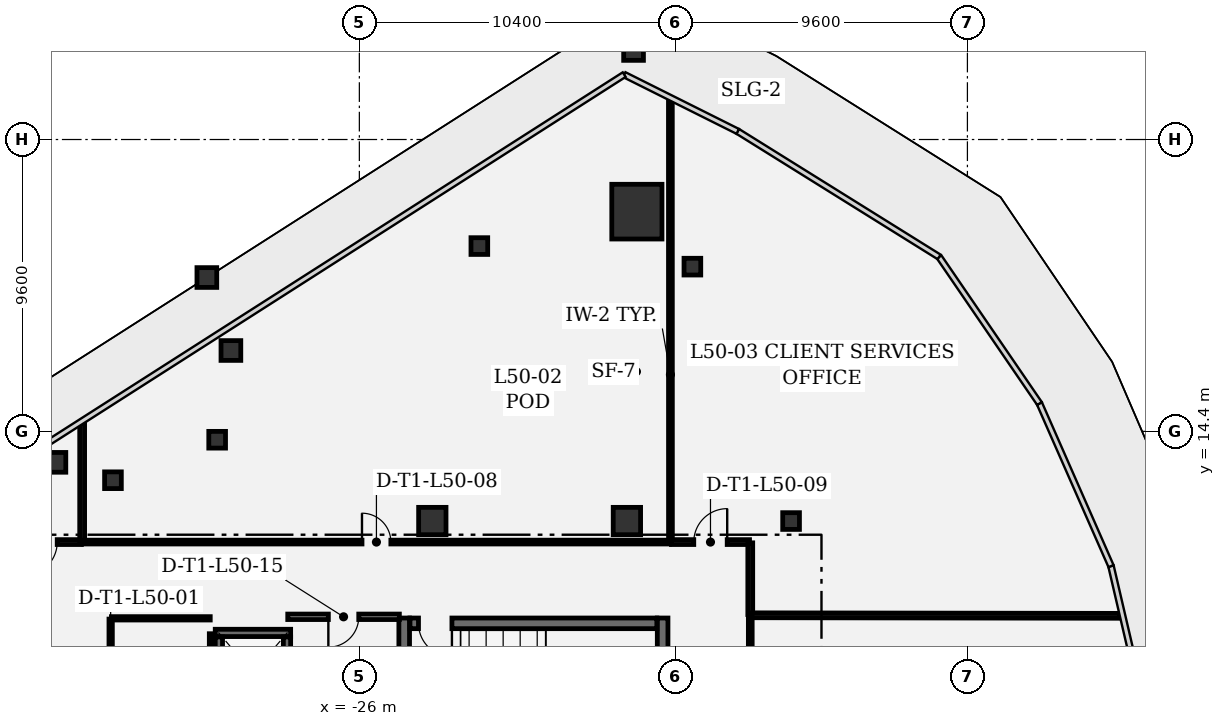
"""IFC4 building model, lengths in metres.
Left out: names, types, materials, properties, quantities, classifications, styles, units other than length and angle.
Written with IfcOpenShell. Run it as: python <this file> out.ifc"""

import sys

from ifc_helpers import new_model, si_unit, direction, frame, frame_2d, origin, origin_2d, place, context, subcontext, project, spatial, rectangle, extrude, element, fill, save


model = new_model("IFC4")
c1 = context("Model", 3, precision=1e-05, world=origin(), true_north=direction((0.0, 1.0)))
c2 = subcontext(c1, "Body", "Model", "MODEL_VIEW")
j1 = project(units=[si_unit("LENGTHUNIT", "METRE"), si_unit("PLANEANGLEUNIT", "RADIAN")], contexts=[c1])
p1 = place(None, origin())
s1 = spatial("IfcSite", under=j1, at=p1, CompositionType="ELEMENT")
p2 = place(p1, origin())
s2 = spatial("IfcBuilding", under=s1, at=p2, CompositionType="ELEMENT")
p3 = place(p2, frame((0.0, 0.0, 217.2)))
s3 = spatial("IfcBuildingStorey", under=s2, at=p3, CompositionType="ELEMENT", Elevation=217.2)
p4 = place(p3, frame((-16.872, 21.627, 0.0), z_axis=(0.0, 0.0, 1.0), x_axis=(1.0, 0.0, 0.0)))
e1 = element("IfcColumn", 1, at=p4, inside=s3, PredefinedType="COLUMN", context=c2, shape_type="SweptSolid", body=[
    extrude(rectangle(XDim=1.65, YDim=1.8, at=origin_2d()), origin(), (0.0, 0.0, 1.0), 4.05),
])
for number, where, z_axis, x_axis in (
    (2, (-23.6, 11.45, 0.0), (0.0, 0.0, 1.0), (1.0, 0.0, 0.0)),
    (3, (-17.2, 11.45, 0.0), (0.0, 0.0, 1.0), (1.0, 0.0, 0.0)),
):
    element("IfcColumn", number, at=place(p3, frame(where, z_axis=z_axis, x_axis=x_axis)), inside=s3, PredefinedType="COLUMN", context=c2, shape_type="SweptSolid", body=[
        extrude(rectangle(XDim=0.9, YDim=0.9, at=origin_2d()), origin(), (0.0, 0.0, 1.0), 4.05),
    ])
for number, where, z_axis, x_axis in (
    (4, (-31.016, 19.46, 0.0), (0.0, 0.0, 1.0), (1.0, 0.0, 0.0)),
    (5, (-16.981, 26.929, 0.0), (0.0, 0.0, 1.0), (1.0, 0.0, 0.0)),
    (6, (-35.981, 13.381, 0.0), (0.0, 0.0, 1.0), (1.0, 0.0, 0.0)),
    (7, (-30.225, 17.06, 0.0), (0.0, 0.0, 1.0), (1.0, 0.0, 0.0)),
):
    element("IfcColumn", number, at=place(p3, frame(where, z_axis=z_axis, x_axis=x_axis)), inside=s3, PredefinedType="COLUMN", context=c2, shape_type="SweptSolid", body=[
        extrude(rectangle(XDim=0.65, YDim=0.65, at=origin_2d()), origin(), (0.0, 0.0, 1.0), 4.05),
    ])
for number, where, z_axis, x_axis in (
    (8, (-34.104, 12.792, 0.0), (0.0, 0.0, 1.0), (1.0, 0.0, 0.0)),
    (9, (-22.053, 20.495, 0.0), (0.0, 0.0, 1.0), (1.0, 0.0, 0.0)),
    (10, (-30.677, 14.124, 0.0), (0.0, 0.0, 1.0), (1.0, 0.0, 0.0)),
    (11, (-15.046, 19.818, 0.0), (0.0, 0.0, 1.0), (1.0, 0.0, 0.0)),
    (12, (-11.8, 11.45, 0.0), (0.0, 0.0, 1.0), (1.0, 0.0, 0.0)),
):
    element("IfcColumn", number, at=place(p3, frame(where, z_axis=z_axis, x_axis=x_axis)), inside=s3, PredefinedType="COLUMN", context=c2, shape_type="SweptSolid", body=[
        extrude(rectangle(XDim=0.55, YDim=0.55, at=origin_2d()), origin(), (0.0, 0.0, 1.0), 4.05),
    ])
for number, where, z_axis, x_axis in (
    (13, (-24.525, 8.26, 0.0), (0.0, 0.0, 1.0), (0.0, -1.0, 0.0)),
    (14, (-16.025, 4.05, 0.0), (0.0, 0.0, 1.0), (0.0, 1.0, 0.0)),
):
    element("IfcWall", number, at=place(p3, frame(where, z_axis=z_axis, x_axis=x_axis)), inside=s3, PredefinedType="SHEAR", context=c2, shape_type="SweptSolid", body=[
        extrude(rectangle(XDim=4.21, YDim=0.35, at=frame_2d((2.105, 0.0))), origin(), (0.0, 0.0, 1.0), 3.78),
    ])
p5 = place(p3, frame((-16.215, 8.085, 0.0), z_axis=(0.0, 0.0, 1.0), x_axis=(-1.0, 0.0, 0.0)))
e15 = element("IfcWall", 15, at=p5, inside=s3, PredefinedType="SHEAR", context=c2, shape_type="SweptSolid", body=[
    extrude(rectangle(XDim=8.12, YDim=0.35, at=frame_2d((4.06, 0.0))), origin(), (0.0, 0.0, 1.0), 3.78),
])
p6 = place(p5, frame((6.74, 0.0, 0.0)))
e16 = element("IfcOpeningElement", 16, at=p6, cuts=e15, PredefinedType="OPENING", context=c2, shape_type="SweptSolid", body=[
    extrude(rectangle(XDim=1.1, YDim=2.2, at=frame_2d((0.55, 1.1))), frame((0.0, 0.185, 0.0), z_axis=(0.0, -1.0, 0.0), x_axis=(1.0, 0.0, 0.0)), (0.0, 0.0, 1.0), 0.37),
])
p7 = place(p3, frame((-30.74, 7.77, 0.0), z_axis=(0.0, 0.0, 1.0), x_axis=(1.0, 0.0, 0.0)))
e17 = element("IfcWall", 17, at=p7, inside=s3, PredefinedType="SHEAR", context=c2, shape_type="SweptSolid", body=[
    extrude(rectangle(XDim=2.48, YDim=0.24, at=frame_2d((1.24, 0.0))), origin(), (0.0, 0.0, 1.0), 3.78),
])
p8 = place(p3, frame((-30.62, 5.262, 0.0), z_axis=(0.0, 0.0, 1.0), x_axis=(0.0, 1.0, 0.0)))
e18 = element("IfcWall", 18, at=p8, inside=s3, PredefinedType="SHEAR", context=c2, shape_type="SweptSolid", body=[
    extrude(rectangle(XDim=2.376, YDim=0.24, at=frame_2d((1.188, 0.0))), origin(), (0.0, 0.0, 1.0), 3.78),
])
p9 = place(p3, frame((-28.38, 7.638, 0.0), z_axis=(0.0, 0.0, 1.0), x_axis=(0.0, -1.0, 0.0)))
e19 = element("IfcWall", 19, at=p9, inside=s3, PredefinedType="SHEAR", context=c2, shape_type="SweptSolid", body=[
    extrude(rectangle(XDim=2.376, YDim=0.24, at=frame_2d((1.188, 0.0))), origin(), (0.0, 0.0, 1.0), 3.78),
])
p10 = place(p9, frame((0.538, 0.0, 0.0)))
e20 = element("IfcOpeningElement", 20, at=p10, cuts=e19, PredefinedType="OPENING", context=c2, shape_type="SweptSolid", body=[
    extrude(rectangle(XDim=1.3, YDim=2.3, at=frame_2d((0.65, 1.15))), frame((0.0, 0.13, 0.0), z_axis=(0.0, -1.0, 0.0), x_axis=(1.0, 0.0, 0.0)), (0.0, 0.0, 1.0), 0.26),
])
p11 = place(p3, frame((-24.684, 8.3, 0.0), z_axis=(0.0, 0.0, 1.0), x_axis=(-1.0, 0.0, 0.0)))
e21 = element("IfcWall", 21, at=p11, inside=s3, PredefinedType="PARTITIONING", context=c2, shape_type="SweptSolid", body=[
    extrude(rectangle(XDim=3.671, YDim=0.18, at=frame_2d((1.835, 0.0))), origin(), (0.0, 0.0, 1.0), 3.78),
])
p12 = place(p11, frame((1.335, 0.0, 0.0)))
e22 = element("IfcOpeningElement", 22, at=p12, cuts=e21, PredefinedType="OPENING", context=c2, shape_type="SweptSolid", body=[
    extrude(rectangle(XDim=1.0, YDim=2.15, at=frame_2d((0.5, 1.075))), frame((0.0, 0.1, 0.0), z_axis=(0.0, -1.0, 0.0), x_axis=(1.0, 0.0, 0.0)), (0.0, 0.0, 1.0), 0.2),
])
p13 = place(p3, frame((-34.18, 8.225, 0.0), z_axis=(0.0, 0.0, 1.0), x_axis=(0.0, -1.0, 0.0)))
e23 = element("IfcWall", 23, at=p13, inside=s3, PredefinedType="PARTITIONING", context=c2, shape_type="SweptSolid", body=[
    extrude(rectangle(XDim=3.15, YDim=0.11, at=frame_2d((1.575, 0.0))), origin(), (0.0, 0.0, 1.0), 3.78),
])
p14 = place(p13, frame((1.135, 0.0, 0.0)))
e24 = element("IfcOpeningElement", 24, at=p14, cuts=e23, PredefinedType="OPENING", context=c2, shape_type="SweptSolid", body=[
    extrude(rectangle(XDim=0.88, YDim=2.1, at=frame_2d((0.44, 1.05))), frame((0.0, 0.065, 0.0), z_axis=(0.0, -1.0, 0.0), x_axis=(1.0, 0.0, 0.0)), (0.0, 0.0, 1.0), 0.13),
])
p15 = place(p3, frame((-30.88, 5.665, 0.0), z_axis=(0.0, 0.0, 1.0), x_axis=(0.0, 1.0, 0.0)))
e25 = element("IfcWall", 25, at=p15, inside=s3, PredefinedType="PARTITIONING", context=c2, shape_type="SweptSolid", body=[
    extrude(rectangle(XDim=2.078, YDim=0.11, at=frame_2d((1.039, 0.0))), origin(), (0.0, 0.0, 1.0), 3.78),
])
p16 = place(p3, frame((-30.905, 8.25, 0.0), z_axis=(0.0, 0.0, 1.0), x_axis=(-1.0, 0.0, 0.0)))
e26 = element("IfcWall", 26, at=p16, inside=s3, PredefinedType="PARTITIONING", context=c2, shape_type="SweptSolid", body=[
    extrude(rectangle(XDim=3.25, YDim=0.11, at=frame_2d((1.625, 0.0))), origin(), (0.0, 0.0, 1.0), 3.78),
])
p17 = place(p3, frame((-35.142, 10.758, 0.0), z_axis=(0.0, 0.0, 1.0), x_axis=(-1.0, 0.0, 0.0)))
e27 = element("IfcWall", 27, at=p17, inside=s3, PredefinedType="PARTITIONING", context=c2, shape_type="SweptSolid", body=[
    extrude(rectangle(XDim=2.691, YDim=0.16, at=frame_2d((1.345, 0.0))), origin(), (0.0, 0.0, 1.0), 3.0),
])
p18 = place(p17, frame((0.795, 0.0, 0.0)))
e28 = element("IfcOpeningElement", 28, at=p18, cuts=e27, PredefinedType="OPENING", context=c2, shape_type="SweptSolid", body=[
    extrude(rectangle(XDim=1.1, YDim=2.15, at=frame_2d((0.55, 1.075))), frame((0.0, 0.09, 0.0), z_axis=(0.0, -1.0, 0.0), x_axis=(1.0, 0.0, 0.0)), (0.0, 0.0, 1.0), 0.18),
])
p19 = place(p3, frame((-35.117, 10.783, 0.0), z_axis=(0.0, 0.0, 1.0), x_axis=(0.0, 1.0, 0.0)))
e29 = element("IfcWall", 29, at=p19, inside=s3, PredefinedType="PARTITIONING", context=c2, shape_type="SweptSolid", body=[
    extrude(rectangle(XDim=3.876, YDim=0.16, at=frame_2d((1.938, 0.0))), origin(), (0.0, 0.0, 1.0), 3.78),
])
p20 = place(p3, frame((-35.084, 10.758, 0.0), z_axis=(0.0, 0.0, 1.0), x_axis=(1.0, 0.0, 0.0)))
e30 = element("IfcWall", 30, at=p20, inside=s3, PredefinedType="PARTITIONING", context=c2, shape_type="SweptSolid", body=[
    extrude(rectangle(XDim=19.292, YDim=0.125, at=frame_2d((9.646, 0.0))), origin(), (0.0, 0.0, 1.0), 3.0),
])
p21 = place(p20, frame((9.171, 0.0, 0.0)))
e31 = element("IfcOpeningElement", 31, at=p21, cuts=e30, PredefinedType="OPENING", context=c2, shape_type="SweptSolid", body=[
    extrude(rectangle(XDim=0.95, YDim=2.15, at=frame_2d((0.475, 1.075))), frame((0.0, 0.073, 0.0), z_axis=(0.0, -1.0, 0.0), x_axis=(1.0, 0.0, 0.0)), (0.0, 0.0, 1.0), 0.145),
])
p22 = place(p3, frame((-15.767, 10.783, 0.0), z_axis=(0.0, 0.0, 1.0), x_axis=(-0.000168234045, 0.999999985849, 0.0)))
e32 = element("IfcWall", 32, at=p22, inside=s3, PredefinedType="PARTITIONING", context=c2, shape_type="SweptSolid", body=[
    extrude(rectangle(XDim=14.512, YDim=0.125, at=frame_2d((7.256, 0.0))), origin(), (0.0, 0.0, 1.0), 3.0),
])
p23 = place(p3, frame((-15.734, 10.758, 0.0), z_axis=(0.0, 0.0, 1.0), x_axis=(1.0, 0.0, 0.0)))
e33 = element("IfcWall", 33, at=p23, inside=s3, PredefinedType="PARTITIONING", context=c2, shape_type="SweptSolid", body=[
    extrude(rectangle(XDim=2.567, YDim=0.16, at=frame_2d((1.284, 0.0))), origin(), (0.0, 0.0, 1.0), 3.344),
])
p24 = place(p23, frame((0.734, 0.0, 0.0)))
e34 = element("IfcOpeningElement", 34, at=p24, cuts=e33, PredefinedType="OPENING", context=c2, shape_type="SweptSolid", body=[
    extrude(rectangle(XDim=1.1, YDim=2.15, at=frame_2d((0.55, 1.075))), frame((0.0, 0.09, 0.0), z_axis=(0.0, -1.0, 0.0), x_axis=(1.0, 0.0, 0.0)), (0.0, 0.0, 1.0), 0.18),
])
p25 = place(p3, frame((-13.142, 10.733, 0.0), z_axis=(0.0, 0.0, 1.0), x_axis=(0.0, -1.0, 0.0)))
e35 = element("IfcWall", 35, at=p25, inside=s3, PredefinedType="PARTITIONING", context=c2, shape_type="SweptSolid", body=[
    extrude(rectangle(XDim=2.358, YDim=0.16, at=frame_2d((1.179, 0.0))), origin(), (0.0, 0.0, 1.0), 3.0),
])
p26 = place(p3, frame((-13.117, 8.35, 0.0), z_axis=(0.0, 0.0, 1.0), x_axis=(0.999998922727, -0.001467836675, 0.0)))
e36 = element("IfcWall", 36, at=p26, inside=s3, PredefinedType="PARTITIONING", context=c2, shape_type="SweptSolid", body=[
    extrude(rectangle(XDim=12.142, YDim=0.16, at=frame_2d((6.071, 0.0))), origin(), (0.0, 0.0, 1.0), 3.344),
])
p27 = place(p3, frame((-13.142, 8.317, 0.0), z_axis=(0.0, 0.0, 1.0), x_axis=(0.0, -1.0, 0.0)))
e37 = element("IfcWall", 37, at=p27, inside=s3, PredefinedType="PARTITIONING", context=c2, shape_type="SweptSolid", body=[
    extrude(rectangle(XDim=6.984, YDim=0.125, at=frame_2d((3.492, 0.0))), origin(), (0.0, 0.0, 1.0), 3.0),
])
p28 = place(p6, origin())
e38 = element("IfcDoor", 38, at=p28, inside=s3, OperationType="SINGLE_SWING_LEFT", PredefinedType="DOOR", context=c2, shape_type="SweptSolid", body=[
    extrude(rectangle(XDim=1.1, YDim=2.2, at=frame_2d((0.55, 1.1))), frame((0.0, 0.025, 0.0), z_axis=(0.0, -1.0, 0.0), x_axis=(1.0, 0.0, 0.0)), (0.0, 0.0, 1.0), 0.05),
])
fill(e16, e38)
p29 = place(p18, origin())
e39 = element("IfcDoor", 39, at=p29, inside=s3, OperationType="SINGLE_SWING_RIGHT", PredefinedType="DOOR", context=c2, shape_type="SweptSolid", body=[
    extrude(rectangle(XDim=1.1, YDim=2.15, at=frame_2d((0.55, 1.075))), frame((0.0, 0.025, 0.0), z_axis=(0.0, -1.0, 0.0), x_axis=(1.0, 0.0, 0.0)), (0.0, 0.0, 1.0), 0.05),
])
fill(e28, e39)
p30 = place(p21, origin())
e40 = element("IfcDoor", 40, at=p30, inside=s3, OperationType="SINGLE_SWING_LEFT", PredefinedType="DOOR", context=c2, shape_type="SweptSolid", body=[
    extrude(rectangle(XDim=0.95, YDim=2.15, at=frame_2d((0.475, 1.075))), frame((0.0, 0.025, 0.0), z_axis=(0.0, -1.0, 0.0), x_axis=(1.0, 0.0, 0.0)), (0.0, 0.0, 1.0), 0.05),
])
fill(e31, e40)
p31 = place(p24, origin())
e41 = element("IfcDoor", 41, at=p31, inside=s3, OperationType="SINGLE_SWING_RIGHT", PredefinedType="DOOR", context=c2, shape_type="SweptSolid", body=[
    extrude(rectangle(XDim=1.1, YDim=2.15, at=frame_2d((0.55, 1.075))), frame((0.0, 0.025, 0.0), z_axis=(0.0, -1.0, 0.0), x_axis=(1.0, 0.0, 0.0)), (0.0, 0.0, 1.0), 0.05),
])
fill(e34, e41)
p32 = place(p12, origin())
e42 = element("IfcDoor", 42, at=p32, inside=s3, OperationType="SINGLE_SWING_RIGHT", PredefinedType="DOOR", context=c2, shape_type="SweptSolid", body=[
    extrude(rectangle(XDim=1.0, YDim=2.15, at=frame_2d((0.5, 1.075))), frame((0.0, 0.025, 0.0), z_axis=(0.0, -1.0, 0.0), x_axis=(1.0, 0.0, 0.0)), (0.0, 0.0, 1.0), 0.05),
])
fill(e22, e42)
save(model, sys.argv[1])
